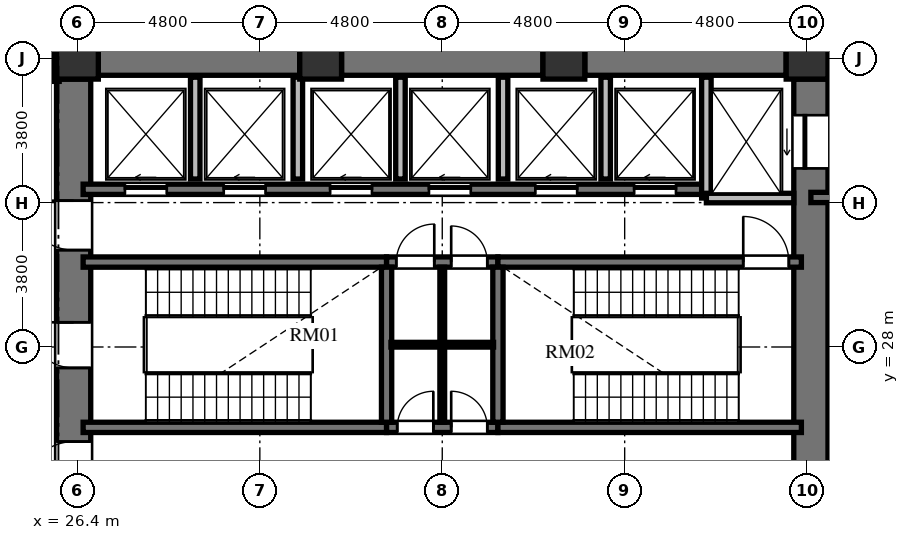
"""IFC4 building model, lengths in metres.
Left out: names, types, materials, properties, quantities, classifications, styles, units other than length and angle.
Written with IfcOpenShell. Run it as: python <this file> out.ifc"""

import sys

from ifc_helpers import new_model, si_unit, direction, frame, frame_2d, origin, origin_2d, place, context, subcontext, project, spatial, rectangle, extrude, element, fill, save


model = new_model("IFC4")
c1 = context("Model", 3, precision=1e-05, world=origin(), true_north=direction((0.0, 1.0)))
c2 = subcontext(c1, "Body", "Model", "MODEL_VIEW")
j1 = project(units=[si_unit("LENGTHUNIT", "METRE"), si_unit("PLANEANGLEUNIT", "RADIAN")], contexts=[c1])
p1 = place(None, origin())
s1 = spatial("IfcSite", under=j1, at=p1, CompositionType="ELEMENT")
p2 = place(p1, origin())
s2 = spatial("IfcBuilding", under=s1, at=p2, CompositionType="ELEMENT")
p3 = place(p2, frame((0.0, 0.0, 10.8)))
s3 = spatial("IfcBuildingStorey", under=s2, at=p3, CompositionType="ELEMENT", Elevation=10.8)
for number, where, z_axis, x_axis in (
    (1, (45.6, 35.6, 0.0), (0.0, 0.0, 1.0), (1.0, 0.0, 0.0)),
    (2, (39.2, 35.6, 0.0), (0.0, 0.0, 1.0), (1.0, 0.0, 0.0)),
    (3, (32.8, 35.6, 0.0), (0.0, 0.0, 1.0), (1.0, 0.0, 0.0)),
    (4, (26.4, 35.6, 0.0), (0.0, 0.0, 1.0), (1.0, 0.0, 0.0)),
):
    element("IfcColumn", number, at=place(p3, frame(where, z_axis=z_axis, x_axis=x_axis)), inside=s3, PredefinedType="COLUMN", context=c2, shape_type="SweptSolid", body=[
        extrude(rectangle(XDim=1.1, YDim=1.1, at=origin_2d()), origin(), (0.0, 0.0, 1.0), 4.8),
    ])
p4 = place(p3, frame((26.3, 20.95, 0.0), z_axis=(0.0, 0.0, 1.0), x_axis=(0.0, 1.0, 0.0)))
e5 = element("IfcWall", 5, at=p4, inside=s3, PredefinedType="SHEAR", context=c2, shape_type="SweptSolid", body=[
    extrude(rectangle(XDim=14.1, YDim=0.9, at=frame_2d((7.05, 0.0))), origin(), (0.0, 0.0, 1.0), 4.8),
])
p5 = place(p4, frame((6.5, 0.0, 0.0)))
e6 = element("IfcOpeningElement", 6, at=p5, cuts=e5, PredefinedType="OPENING", context=c2, shape_type="SweptSolid", body=[
    extrude(rectangle(XDim=1.2, YDim=2.15, at=frame_2d((0.6, 1.075))), frame((0.0, 0.46, 0.0), z_axis=(0.0, -1.0, 0.0), x_axis=(1.0, 0.0, 0.0)), (0.0, 0.0, 1.0), 0.92),
])
p6 = place(p4, frame((9.6, 0.0, 0.0)))
e7 = element("IfcOpeningElement", 7, at=p6, cuts=e5, PredefinedType="OPENING", context=c2, shape_type="SweptSolid", body=[
    extrude(rectangle(XDim=1.3, YDim=2.2, at=frame_2d((0.65, 1.1))), frame((0.0, 0.46, 0.0), z_axis=(0.0, -1.0, 0.0), x_axis=(1.0, 0.0, 0.0)), (0.0, 0.0, 1.0), 0.92),
])
p7 = place(p4, frame((3.26, 0.0, 0.0)))
e8 = element("IfcOpeningElement", 8, at=p7, cuts=e5, PredefinedType="OPENING", context=c2, shape_type="SweptSolid", body=[
    extrude(rectangle(XDim=1.3, YDim=2.2, at=frame_2d((0.65, 1.1))), frame((0.0, 0.46, 0.0), z_axis=(0.0, -1.0, 0.0), x_axis=(1.0, 0.0, 0.0)), (0.0, 0.0, 1.0), 0.92),
])
p8 = place(p3, frame((45.7, 20.95, 0.0), z_axis=(0.0, 0.0, 1.0), x_axis=(0.0, 1.0, 0.0)))
e9 = element("IfcWall", 9, at=p8, inside=s3, PredefinedType="SHEAR", context=c2, shape_type="SweptSolid", body=[
    extrude(rectangle(XDim=14.1, YDim=0.9, at=frame_2d((7.05, 0.0))), origin(), (0.0, 0.0, 1.0), 4.8),
])
p9 = place(p8, frame((11.75, 0.0, 0.0)))
e10 = element("IfcOpeningElement", 10, at=p9, cuts=e9, PredefinedType="OPENING", context=c2, shape_type="SweptSolid", body=[
    extrude(rectangle(XDim=1.4, YDim=2.3, at=frame_2d((0.7, 1.15))), frame((0.0, 0.46, 0.0), z_axis=(0.0, -1.0, 0.0), x_axis=(1.0, 0.0, 0.0)), (0.0, 0.0, 1.0), 0.92),
])
p10 = place(p8, frame((0.95, 0.0, 0.0)))
e11 = element("IfcOpeningElement", 11, at=p10, cuts=e9, PredefinedType="OPENING", context=c2, shape_type="SweptSolid", body=[
    extrude(rectangle(XDim=1.4, YDim=2.3, at=frame_2d((0.7, 1.15))), frame((0.0, 0.46, 0.0), z_axis=(0.0, -1.0, 0.0), x_axis=(1.0, 0.0, 0.0)), (0.0, 0.0, 1.0), 0.92),
])
p11 = place(p3, frame((26.95, 35.6, 0.0), z_axis=(0.0, 0.0, 1.0), x_axis=(1.0, 0.0, 0.0)))
e12 = element("IfcWall", 12, at=p11, inside=s3, PredefinedType="SHEAR", context=c2, shape_type="SweptSolid", body=[
    extrude(rectangle(XDim=5.3, YDim=0.9, at=frame_2d((2.65, 0.0))), origin(), (0.0, 0.0, 1.0), 4.8),
])
p12 = place(p3, frame((33.35, 35.6, 0.0), z_axis=(0.0, 0.0, 1.0), x_axis=(1.0, 0.0, 0.0)))
e13 = element("IfcWall", 13, at=p12, inside=s3, PredefinedType="SHEAR", context=c2, shape_type="SweptSolid", body=[
    extrude(rectangle(XDim=5.3, YDim=0.9, at=frame_2d((2.65, 0.0))), origin(), (0.0, 0.0, 1.0), 4.8),
])
p13 = place(p3, frame((39.75, 35.6, 0.0), z_axis=(0.0, 0.0, 1.0), x_axis=(1.0, 0.0, 0.0)))
e14 = element("IfcWall", 14, at=p13, inside=s3, PredefinedType="SHEAR", context=c2, shape_type="SweptSolid", body=[
    extrude(rectangle(XDim=5.3, YDim=0.9, at=frame_2d((2.65, 0.0))), origin(), (0.0, 0.0, 1.0), 4.8),
])
p14 = place(p3, frame((26.55, 30.235, 0.0), z_axis=(0.0, 0.0, 1.0), x_axis=(1.0, 0.0, 0.0)))
e15 = element("IfcWall", 15, at=p14, inside=s3, PredefinedType="SHEAR", context=c2, shape_type="SweptSolid", body=[
    extrude(rectangle(XDim=7.985, YDim=0.27, at=frame_2d((3.992, 0.0))), origin(), (0.0, 0.0, 1.0), 4.8),
])
p15 = place(p3, frame((34.535, 30.235, 0.0), z_axis=(0.0, 0.0, 1.0), x_axis=(1.0, 0.0, 0.0)))
e16 = element("IfcWall", 16, at=p15, inside=s3, PredefinedType="SHEAR", context=c2, shape_type="SweptSolid", body=[
    extrude(rectangle(XDim=2.93, YDim=0.27, at=frame_2d((1.465, 0.0))), origin(), (0.0, 0.0, 1.0), 4.8),
])
p16 = place(p15, frame((0.255, 0.0, 0.0)))
e17 = element("IfcOpeningElement", 17, at=p16, cuts=e16, PredefinedType="OPENING", context=c2, shape_type="SweptSolid", body=[
    extrude(rectangle(XDim=1.0, YDim=2.1, at=frame_2d((0.5, 1.05))), frame((0.0, 0.145, 0.0), z_axis=(0.0, -1.0, 0.0), x_axis=(1.0, 0.0, 0.0)), (0.0, 0.0, 1.0), 0.29),
])
p17 = place(p15, frame((1.7, 0.0, 0.0)))
e18 = element("IfcOpeningElement", 18, at=p17, cuts=e16, PredefinedType="OPENING", context=c2, shape_type="SweptSolid", body=[
    extrude(rectangle(XDim=0.95, YDim=2.1, at=frame_2d((0.475, 1.05))), frame((0.0, 0.145, 0.0), z_axis=(0.0, -1.0, 0.0), x_axis=(1.0, 0.0, 0.0)), (0.0, 0.0, 1.0), 0.29),
])
p18 = place(p3, frame((37.465, 30.235, 0.0), z_axis=(0.0, 0.0, 1.0), x_axis=(1.0, 0.0, 0.0)))
e19 = element("IfcWall", 19, at=p18, inside=s3, PredefinedType="SHEAR", context=c2, shape_type="SweptSolid", body=[
    extrude(rectangle(XDim=7.985, YDim=0.27, at=frame_2d((3.992, 0.0))), origin(), (0.0, 0.0, 1.0), 4.8),
])
p19 = place(p18, frame((6.455, 0.0, 0.0)))
e20 = element("IfcOpeningElement", 20, at=p19, cuts=e19, PredefinedType="OPENING", context=c2, shape_type="SweptSolid", body=[
    extrude(rectangle(XDim=1.2, YDim=2.15, at=frame_2d((0.6, 1.075))), frame((0.0, 0.145, 0.0), z_axis=(0.0, -1.0, 0.0), x_axis=(1.0, 0.0, 0.0)), (0.0, 0.0, 1.0), 0.29),
])
p20 = place(p3, frame((26.55, 25.885, 0.0), z_axis=(0.0, 0.0, 1.0), x_axis=(1.0, 0.0, 0.0)))
e21 = element("IfcWall", 21, at=p20, inside=s3, PredefinedType="SHEAR", context=c2, shape_type="SweptSolid", body=[
    extrude(rectangle(XDim=7.985, YDim=0.27, at=frame_2d((3.992, 0.0))), origin(), (0.0, 0.0, 1.0), 4.8),
])
p21 = place(p3, frame((34.535, 25.885, 0.0), z_axis=(0.0, 0.0, 1.0), x_axis=(1.0, 0.0, 0.0)))
e22 = element("IfcWall", 22, at=p21, inside=s3, PredefinedType="SHEAR", context=c2, shape_type="SweptSolid", body=[
    extrude(rectangle(XDim=2.93, YDim=0.27, at=frame_2d((1.465, 0.0))), origin(), (0.0, 0.0, 1.0), 4.8),
])
p22 = place(p21, frame((0.28, 0.0, 0.0)))
e23 = element("IfcOpeningElement", 23, at=p22, cuts=e22, PredefinedType="OPENING", context=c2, shape_type="SweptSolid", body=[
    extrude(rectangle(XDim=0.95, YDim=2.1, at=frame_2d((0.475, 1.05))), frame((0.0, 0.145, 0.0), z_axis=(0.0, -1.0, 0.0), x_axis=(1.0, 0.0, 0.0)), (0.0, 0.0, 1.0), 0.29),
])
p23 = place(p21, frame((1.7, 0.0, 0.0)))
e24 = element("IfcOpeningElement", 24, at=p23, cuts=e22, PredefinedType="OPENING", context=c2, shape_type="SweptSolid", body=[
    extrude(rectangle(XDim=0.95, YDim=2.1, at=frame_2d((0.475, 1.05))), frame((0.0, 0.145, 0.0), z_axis=(0.0, -1.0, 0.0), x_axis=(1.0, 0.0, 0.0)), (0.0, 0.0, 1.0), 0.29),
])
p24 = place(p3, frame((37.465, 25.885, 0.0), z_axis=(0.0, 0.0, 1.0), x_axis=(1.0, 0.0, 0.0)))
e25 = element("IfcWall", 25, at=p24, inside=s3, PredefinedType="SHEAR", context=c2, shape_type="SweptSolid", body=[
    extrude(rectangle(XDim=7.985, YDim=0.27, at=frame_2d((3.992, 0.0))), origin(), (0.0, 0.0, 1.0), 4.8),
])
for number, where, z_axis, x_axis in (
    (26, (34.535, 26.02, 0.0), (0.0, 0.0, 1.0), (0.0, 1.0, 0.0)),
    (27, (37.465, 26.02, 0.0), (0.0, 0.0, 1.0), (0.0, 1.0, 0.0)),
):
    element("IfcWall", number, at=place(p3, frame(where, z_axis=z_axis, x_axis=x_axis)), inside=s3, PredefinedType="SHEAR", context=c2, shape_type="SweptSolid", body=[
        extrude(rectangle(XDim=4.08, YDim=0.27, at=frame_2d((2.04, 0.0))), origin(), (0.0, 0.0, 1.0), 4.8),
    ])
p25 = place(p3, frame((34.65, 28.06, 0.0), z_axis=(0.0, 0.0, 1.0), x_axis=(1.0, 0.0, 0.0)))
e28 = element("IfcWall", 28, at=p25, inside=s3, PredefinedType="PARTITIONING", context=c2, shape_type="SweptSolid", body=[
    extrude(rectangle(XDim=2.7, YDim=0.125, at=frame_2d((1.35, 0.0))), origin(), (0.0, 0.0, 1.0), 4.52),
])
p26 = place(p3, frame((36.0, 26.02, 0.0), z_axis=(0.0, 0.0, 1.0), x_axis=(0.0, 1.0, 0.0)))
e29 = element("IfcWall", 29, at=p26, inside=s3, PredefinedType="PARTITIONING", context=c2, shape_type="SweptSolid", body=[
    extrude(rectangle(XDim=4.08, YDim=0.125, at=frame_2d((2.04, 0.0))), origin(), (0.0, 0.0, 1.0), 4.52),
])
p27 = place(p3, frame((26.55, 32.15, 0.0), z_axis=(0.0, 0.0, 1.0), x_axis=(1.0, 0.0, 0.0)))
e30 = element("IfcWall", 30, at=p27, inside=s3, PredefinedType="SHEAR", context=c2, shape_type="SweptSolid", body=[
    extrude(rectangle(XDim=16.4, YDim=0.27, at=frame_2d((8.2, 0.0))), origin(), (0.0, 0.0, 1.0), 4.8),
])
p28 = place(p27, frame((1.1, 0.0, 0.0)))
e31 = element("IfcOpeningElement", 31, at=p28, cuts=e30, PredefinedType="OPENING", context=c2, shape_type="SweptSolid", body=[
    extrude(rectangle(XDim=1.1, YDim=2.2, at=frame_2d((0.55, 1.1))), frame((0.0, 0.145, 0.0), z_axis=(0.0, -1.0, 0.0), x_axis=(1.0, 0.0, 0.0)), (0.0, 0.0, 1.0), 0.29),
])
p29 = place(p27, frame((3.7, 0.0, 0.0)))
e32 = element("IfcOpeningElement", 32, at=p29, cuts=e30, PredefinedType="OPENING", context=c2, shape_type="SweptSolid", body=[
    extrude(rectangle(XDim=1.1, YDim=2.2, at=frame_2d((0.55, 1.1))), frame((0.0, 0.145, 0.0), z_axis=(0.0, -1.0, 0.0), x_axis=(1.0, 0.0, 0.0)), (0.0, 0.0, 1.0), 0.29),
])
p30 = place(p27, frame((6.5, 0.0, 0.0)))
e33 = element("IfcOpeningElement", 33, at=p30, cuts=e30, PredefinedType="OPENING", context=c2, shape_type="SweptSolid", body=[
    extrude(rectangle(XDim=1.1, YDim=2.2, at=frame_2d((0.55, 1.1))), frame((0.0, 0.145, 0.0), z_axis=(0.0, -1.0, 0.0), x_axis=(1.0, 0.0, 0.0)), (0.0, 0.0, 1.0), 0.29),
])
p31 = place(p27, frame((9.1, 0.0, 0.0)))
e34 = element("IfcOpeningElement", 34, at=p31, cuts=e30, PredefinedType="OPENING", context=c2, shape_type="SweptSolid", body=[
    extrude(rectangle(XDim=1.1, YDim=2.2, at=frame_2d((0.55, 1.1))), frame((0.0, 0.145, 0.0), z_axis=(0.0, -1.0, 0.0), x_axis=(1.0, 0.0, 0.0)), (0.0, 0.0, 1.0), 0.29),
])
p32 = place(p27, frame((11.9, 0.0, 0.0)))
e35 = element("IfcOpeningElement", 35, at=p32, cuts=e30, PredefinedType="OPENING", context=c2, shape_type="SweptSolid", body=[
    extrude(rectangle(XDim=1.1, YDim=2.2, at=frame_2d((0.55, 1.1))), frame((0.0, 0.145, 0.0), z_axis=(0.0, -1.0, 0.0), x_axis=(1.0, 0.0, 0.0)), (0.0, 0.0, 1.0), 0.29),
])
p33 = place(p27, frame((14.5, 0.0, 0.0)))
e36 = element("IfcOpeningElement", 36, at=p33, cuts=e30, PredefinedType="OPENING", context=c2, shape_type="SweptSolid", body=[
    extrude(rectangle(XDim=1.1, YDim=2.2, at=frame_2d((0.55, 1.1))), frame((0.0, 0.145, 0.0), z_axis=(0.0, -1.0, 0.0), x_axis=(1.0, 0.0, 0.0)), (0.0, 0.0, 1.0), 0.29),
])
p34 = place(p3, frame((42.95, 31.92, 0.0), z_axis=(0.0, 0.0, 1.0), x_axis=(0.0, 1.0, 0.0)))
e37 = element("IfcWall", 37, at=p34, inside=s3, PredefinedType="SOLIDWALL", context=c2, shape_type="SweptSolid", body=[
    extrude(rectangle(XDim=3.18, YDim=0.25, at=frame_2d((1.59, 0.0))), origin(), (0.0, 0.0, 1.0), 4.52),
])
p35 = place(p3, frame((42.95, 31.92, 0.0), z_axis=(0.0, 0.0, 1.0), x_axis=(1.0, 0.0, 0.0)))
e38 = element("IfcWall", 38, at=p35, inside=s3, PredefinedType="SOLIDWALL", context=c2, shape_type="SweptSolid", body=[
    extrude(rectangle(XDim=2.3, YDim=0.25, at=frame_2d((1.15, 0.0))), origin(), (0.0, 0.0, 1.0), 4.52),
])
for number, where, z_axis, x_axis in (
    (39, (29.5, 32.42, 0.0), (0.0, 0.0, 1.0), (0.0, 1.0, 0.0)),
    (40, (32.2, 32.42, 0.0), (0.0, 0.0, 1.0), (0.0, 1.0, 0.0)),
    (41, (34.9, 32.42, 0.0), (0.0, 0.0, 1.0), (0.0, 1.0, 0.0)),
    (42, (37.6, 32.42, 0.0), (0.0, 0.0, 1.0), (0.0, 1.0, 0.0)),
    (43, (40.3, 32.42, 0.0), (0.0, 0.0, 1.0), (0.0, 1.0, 0.0)),
):
    element("IfcWall", number, at=place(p3, frame(where, z_axis=z_axis, x_axis=x_axis)), inside=s3, PredefinedType="SOLIDWALL", context=c2, shape_type="SweptSolid", body=[
        extrude(rectangle(XDim=2.68, YDim=0.25, at=frame_2d((1.34, 0.0))), origin(), (0.0, 0.0, 1.0), 4.52),
    ])
p36 = place(p3, frame((45.7, 31.935, 0.0), z_axis=(0.0, 0.0, 1.0), x_axis=(1.0, 0.0, 0.0)))
e44 = element("IfcWall", 44, at=p36, inside=s3, PredefinedType="SHEAR", context=c2, shape_type="SweptSolid", body=[
    extrude(rectangle(XDim=4.715, YDim=0.27, at=frame_2d((2.357, 0.0))), origin(), (0.0, 0.0, 1.0), 4.8),
])
p37 = place(p3, frame((25.83, 36.21, 0.0), z_axis=(0.0, 0.0, 1.0), x_axis=(0.0, -1.0, 0.0)))
e45 = element("IfcWall", 45, at=p37, inside=s3, PredefinedType="PARTITIONING", context=c2, shape_type="SweptSolid", body=[
    extrude(rectangle(XDim=1.22, YDim=0.18, at=frame_2d((0.61, 0.0))), origin(), (0.0, 0.0, 1.0), 4.52),
])
p38 = place(p5, origin())
e46 = element("IfcDoor", 46, at=p38, inside=s3, OperationType="SINGLE_SWING_RIGHT", PredefinedType="DOOR", context=c2, shape_type="SweptSolid", body=[
    extrude(rectangle(XDim=1.2, YDim=2.15, at=frame_2d((0.6, 1.075))), frame((0.0, 0.025, 0.0), z_axis=(0.0, -1.0, 0.0), x_axis=(1.0, 0.0, 0.0)), (0.0, 0.0, 1.0), 0.05),
])
fill(e6, e46)
p39 = place(p19, origin())
e47 = element("IfcDoor", 47, at=p39, inside=s3, OperationType="SINGLE_SWING_LEFT", PredefinedType="DOOR", context=c2, shape_type="SweptSolid", body=[
    extrude(rectangle(XDim=1.2, YDim=2.15, at=frame_2d((0.6, 1.075))), frame((0.0, 0.025, 0.0), z_axis=(0.0, -1.0, 0.0), x_axis=(1.0, 0.0, 0.0)), (0.0, 0.0, 1.0), 0.05),
])
fill(e20, e47)
p40 = place(p22, origin())
e48 = element("IfcDoor", 48, at=p40, inside=s3, OperationType="SINGLE_SWING_RIGHT", PredefinedType="DOOR", context=c2, shape_type="SweptSolid", body=[
    extrude(rectangle(XDim=0.95, YDim=2.1, at=frame_2d((0.475, 1.05))), frame((0.0, 0.025, 0.0), z_axis=(0.0, -1.0, 0.0), x_axis=(1.0, 0.0, 0.0)), (0.0, 0.0, 1.0), 0.05),
])
fill(e23, e48)
p41 = place(p23, origin())
e49 = element("IfcDoor", 49, at=p41, inside=s3, OperationType="SINGLE_SWING_LEFT", PredefinedType="DOOR", context=c2, shape_type="SweptSolid", body=[
    extrude(rectangle(XDim=0.95, YDim=2.1, at=frame_2d((0.475, 1.05))), frame((0.0, 0.025, 0.0), z_axis=(0.0, -1.0, 0.0), x_axis=(1.0, 0.0, 0.0)), (0.0, 0.0, 1.0), 0.05),
])
fill(e24, e49)
p42 = place(p16, origin())
e50 = element("IfcDoor", 50, at=p42, inside=s3, OperationType="SINGLE_SWING_RIGHT", PredefinedType="DOOR", context=c2, shape_type="SweptSolid", body=[
    extrude(rectangle(XDim=1.0, YDim=2.1, at=frame_2d((0.5, 1.05))), frame((0.0, 0.025, 0.0), z_axis=(0.0, -1.0, 0.0), x_axis=(1.0, 0.0, 0.0)), (0.0, 0.0, 1.0), 0.05),
])
fill(e17, e50)
p43 = place(p17, origin())
e51 = element("IfcDoor", 51, at=p43, inside=s3, OperationType="SINGLE_SWING_LEFT", PredefinedType="DOOR", context=c2, shape_type="SweptSolid", body=[
    extrude(rectangle(XDim=0.95, YDim=2.1, at=frame_2d((0.475, 1.05))), frame((0.0, 0.025, 0.0), z_axis=(0.0, -1.0, 0.0), x_axis=(1.0, 0.0, 0.0)), (0.0, 0.0, 1.0), 0.05),
])
fill(e18, e51)
p44 = place(p6, origin())
e52 = element("IfcDoor", 52, at=p44, inside=s3, OperationType="SINGLE_SWING_RIGHT", PredefinedType="DOOR", context=c2, shape_type="SweptSolid", body=[
    extrude(rectangle(XDim=1.3, YDim=2.2, at=frame_2d((0.65, 1.1))), frame((0.0, 0.025, 0.0), z_axis=(0.0, -1.0, 0.0), x_axis=(1.0, 0.0, 0.0)), (0.0, 0.0, 1.0), 0.05),
])
fill(e7, e52)
p45 = place(p7, origin())
e53 = element("IfcDoor", 53, at=p45, inside=s3, OperationType="SINGLE_SWING_LEFT", PredefinedType="DOOR", context=c2, shape_type="SweptSolid", body=[
    extrude(rectangle(XDim=1.3, YDim=2.2, at=frame_2d((0.65, 1.1))), frame((0.0, 0.025, 0.0), z_axis=(0.0, -1.0, 0.0), x_axis=(1.0, 0.0, 0.0)), (0.0, 0.0, 1.0), 0.05),
])
fill(e8, e53)
p46 = place(p28, origin())
e54 = element("IfcDoor", 54, at=p46, inside=s3, OperationType="SLIDING_TO_LEFT", PredefinedType="DOOR", context=c2, shape_type="SweptSolid", body=[
    extrude(rectangle(XDim=1.1, YDim=2.2, at=frame_2d((0.55, 1.1))), frame((0.0, 0.025, 0.0), z_axis=(0.0, -1.0, 0.0), x_axis=(1.0, 0.0, 0.0)), (0.0, 0.0, 1.0), 0.05),
])
fill(e31, e54)
p47 = place(p29, origin())
e55 = element("IfcDoor", 55, at=p47, inside=s3, OperationType="SLIDING_TO_LEFT", PredefinedType="DOOR", context=c2, shape_type="SweptSolid", body=[
    extrude(rectangle(XDim=1.1, YDim=2.2, at=frame_2d((0.55, 1.1))), frame((0.0, 0.025, 0.0), z_axis=(0.0, -1.0, 0.0), x_axis=(1.0, 0.0, 0.0)), (0.0, 0.0, 1.0), 0.05),
])
fill(e32, e55)
p48 = place(p30, origin())
e56 = element("IfcDoor", 56, at=p48, inside=s3, OperationType="SLIDING_TO_LEFT", PredefinedType="DOOR", context=c2, shape_type="SweptSolid", body=[
    extrude(rectangle(XDim=1.1, YDim=2.2, at=frame_2d((0.55, 1.1))), frame((0.0, 0.025, 0.0), z_axis=(0.0, -1.0, 0.0), x_axis=(1.0, 0.0, 0.0)), (0.0, 0.0, 1.0), 0.05),
])
fill(e33, e56)
p49 = place(p31, origin())
e57 = element("IfcDoor", 57, at=p49, inside=s3, OperationType="SLIDING_TO_LEFT", PredefinedType="DOOR", context=c2, shape_type="SweptSolid", body=[
    extrude(rectangle(XDim=1.1, YDim=2.2, at=frame_2d((0.55, 1.1))), frame((0.0, 0.025, 0.0), z_axis=(0.0, -1.0, 0.0), x_axis=(1.0, 0.0, 0.0)), (0.0, 0.0, 1.0), 0.05),
])
fill(e34, e57)
p50 = place(p32, origin())
e58 = element("IfcDoor", 58, at=p50, inside=s3, OperationType="SLIDING_TO_LEFT", PredefinedType="DOOR", context=c2, shape_type="SweptSolid", body=[
    extrude(rectangle(XDim=1.1, YDim=2.2, at=frame_2d((0.55, 1.1))), frame((0.0, 0.025, 0.0), z_axis=(0.0, -1.0, 0.0), x_axis=(1.0, 0.0, 0.0)), (0.0, 0.0, 1.0), 0.05),
])
fill(e35, e58)
p51 = place(p33, origin())
e59 = element("IfcDoor", 59, at=p51, inside=s3, OperationType="SLIDING_TO_LEFT", PredefinedType="DOOR", context=c2, shape_type="SweptSolid", body=[
    extrude(rectangle(XDim=1.1, YDim=2.2, at=frame_2d((0.55, 1.1))), frame((0.0, 0.025, 0.0), z_axis=(0.0, -1.0, 0.0), x_axis=(1.0, 0.0, 0.0)), (0.0, 0.0, 1.0), 0.05),
])
fill(e36, e59)
p52 = place(p9, origin())
e60 = element("IfcDoor", 60, at=p52, inside=s3, OperationType="SLIDING_TO_LEFT", PredefinedType="DOOR", context=c2, shape_type="SweptSolid", body=[
    extrude(rectangle(XDim=1.4, YDim=2.3, at=frame_2d((0.7, 1.15))), frame((0.0, 0.025, 0.0), z_axis=(0.0, -1.0, 0.0), x_axis=(1.0, 0.0, 0.0)), (0.0, 0.0, 1.0), 0.05),
])
fill(e10, e60)
save(model, sys.argv[1])
